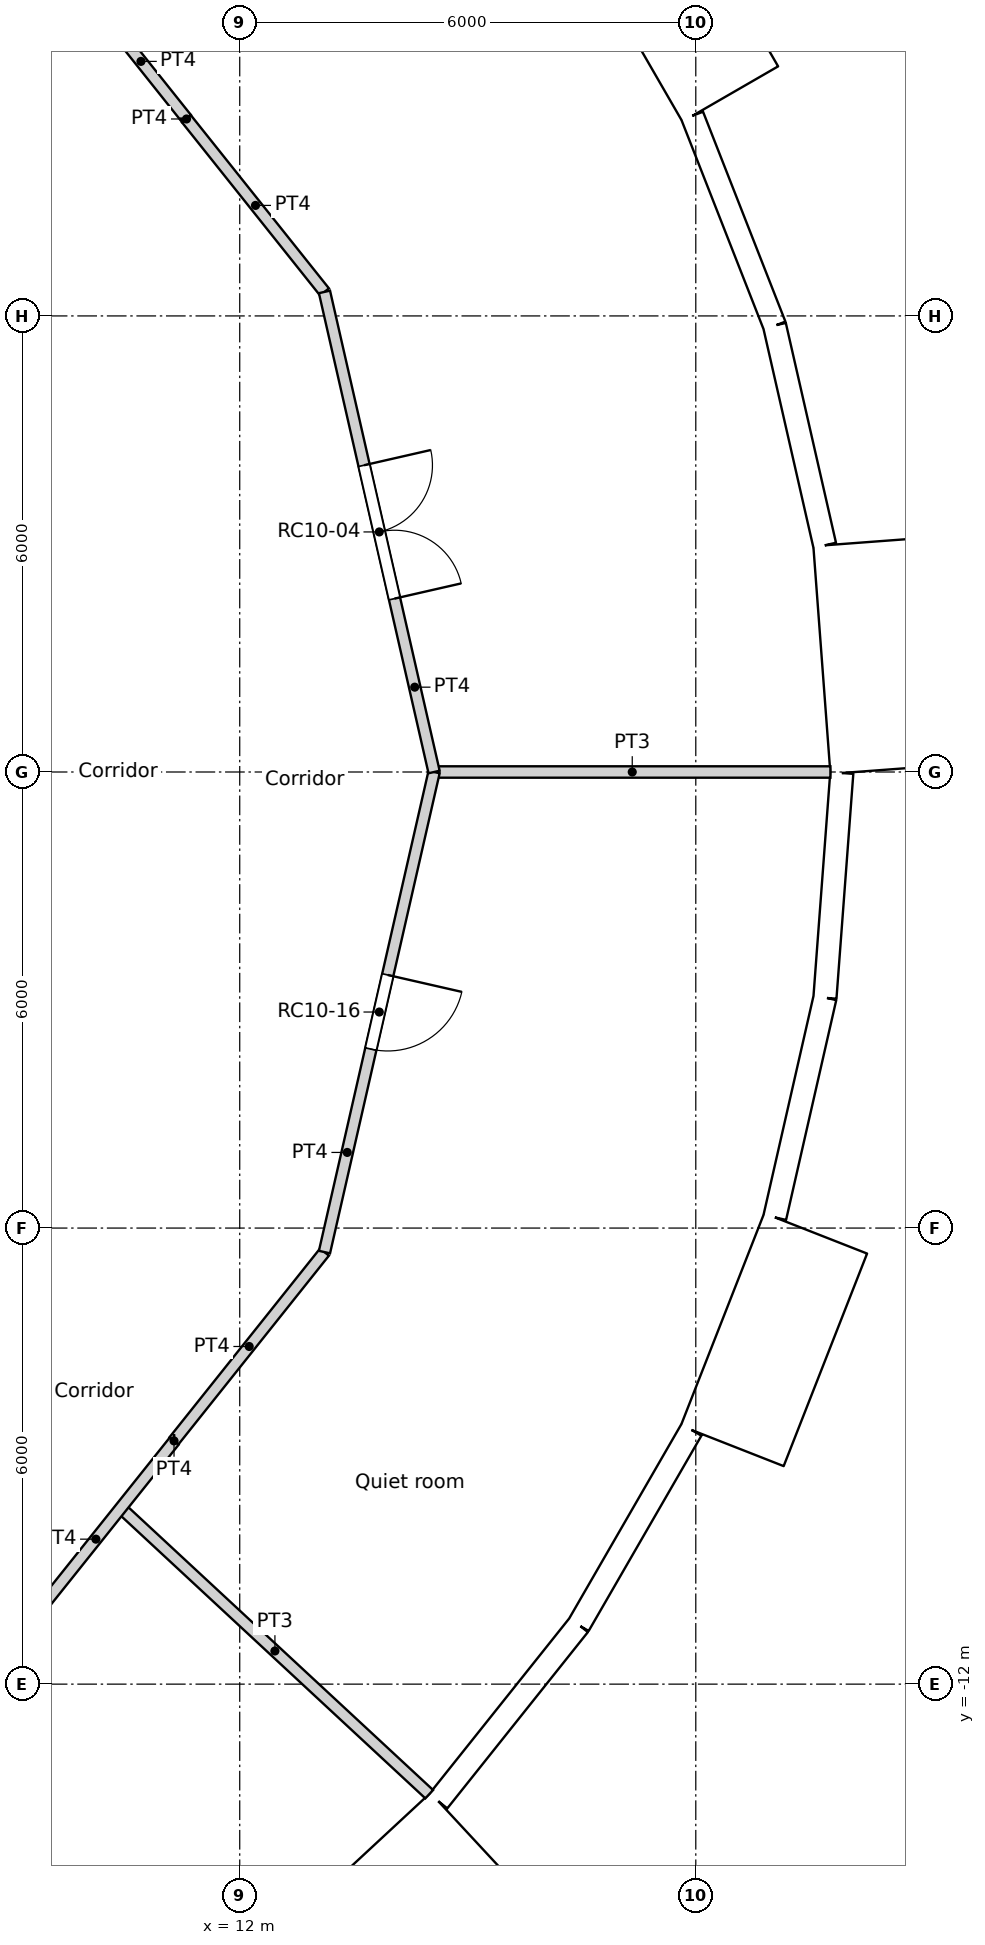
"""IFC4 building model, lengths in metres.
Left out: names, types, materials, properties, quantities, classifications, styles, units other than length and angle.
Written with IfcOpenShell. Run it as: python <this file> out.ifc"""

import sys

from ifc_helpers import new_model, si_unit, direction, frame, frame_2d, origin, origin_2d, place, context, subcontext, project, spatial, rectangle, circle, extrude, element, fill, save


model = new_model("IFC4")
c1 = context("Model", 3, precision=1e-05, world=origin(), true_north=direction((0.0, 1.0)))
c2 = subcontext(c1, "Body", "Model", "MODEL_VIEW")
j1 = project(units=[si_unit("LENGTHUNIT", "METRE"), si_unit("PLANEANGLEUNIT", "RADIAN")], contexts=[c1])
p1 = place(None, origin())
s1 = spatial("IfcSite", under=j1, at=p1, CompositionType="ELEMENT")
p2 = place(p1, origin())
s2 = spatial("IfcBuilding", under=s1, at=p2, CompositionType="ELEMENT")
p3 = place(p2, frame((0.0, 0.0, 323.4)))
s3 = spatial("IfcBuildingStorey", under=s2, at=p3, CompositionType="ELEMENT", Elevation=323.4)
for number, where, z_axis, x_axis in (
    (1, (18.822, 0.0, 0.0), (0.0, 0.0, 1.0), (1.0, 0.0, 0.0)),
    (2, (17.986, 5.548, 0.0), (0.0, 0.0, 1.0), (1.0, 0.0, 0.0)),
    (3, (11.735, -14.716, 0.0), (0.0, 0.0, 1.0), (1.0, 0.0, 0.0)),
    (4, (15.552, -10.603, 0.0), (0.0, 0.0, 1.0), (1.0, 0.0, 0.0)),
    (5, (17.986, -5.548, 0.0), (0.0, 0.0, 1.0), (1.0, 0.0, 0.0)),
):
    element("IfcColumn", number, at=place(p3, frame(where, z_axis=z_axis, x_axis=x_axis)), inside=s3, PredefinedType="COLUMN", context=c2, shape_type="SweptSolid", body=[
        extrude(circle(Radius=0.45, at=origin_2d()), origin(), (0.0, 0.0, 1.0), 3.6),
    ])
p4 = place(p3, frame((20.496, 0.032, -0.35), z_axis=(0.0, 0.0, 1.0), x_axis=(-0.074785902127, 0.997199613339, 0.0)))
e6 = element("IfcWall", 6, at=p4, inside=s3, PredefinedType="ELEMENTEDWALL", context=c2, shape_type="SweptSolid", body=[
    extrude(rectangle(XDim=3.0, YDim=1.45, at=frame_2d((1.5, 0.0))), origin(), (0.0, 0.0, 1.0), 3.6),
])
p5 = place(p4, frame((1.5, 0.0, 1.9)))
e7 = element("IfcOpeningElement", 7, at=p5, cuts=e6, PredefinedType="OPENING", context=c2, shape_type="SweptSolid", body=[
    extrude(circle(Radius=0.9, at=origin_2d()), frame((0.0, 0.735, 0.0), z_axis=(0.0, -1.0, 0.0), x_axis=(1.0, 0.0, 0.0)), (0.0, 0.0, 1.0), 1.47),
])
p6 = place(p3, frame((19.696, 2.984, 0.0), z_axis=(0.0, 0.0, 1.0), x_axis=(-0.222529389789, 0.974925982155, 0.0)))
e8 = element("IfcWall", 8, at=p6, inside=s3, PredefinedType="SOLIDWALL", context=c2, shape_type="SweptSolid", body=[
    extrude(rectangle(XDim=2.962, YDim=0.3, at=frame_2d((1.481, 0.0))), origin(), (0.0, 0.0, 1.0), 3.25),
])
p7 = place(p6, frame((1.481, 0.0, 1.55)))
e9 = element("IfcOpeningElement", 9, at=p7, cuts=e8, PredefinedType="OPENING", context=c2, shape_type="SweptSolid", body=[
    extrude(circle(Radius=0.9, at=origin_2d()), frame((0.0, 0.16, 0.0), z_axis=(0.0, -1.0, 0.0), x_axis=(1.0, 0.0, 0.0)), (0.0, 0.0, 1.0), 0.32),
])
p8 = place(p3, frame((19.037, 5.872, 0.0), z_axis=(0.0, 0.0, 1.0), x_axis=(-0.36530043032, 0.930889679612, 0.0)))
e10 = element("IfcWall", 10, at=p8, inside=s3, PredefinedType="SOLIDWALL", context=c2, shape_type="SweptSolid", body=[
    extrude(rectangle(XDim=2.962, YDim=0.3, at=frame_2d((1.481, 0.0))), origin(), (0.0, 0.0, 1.0), 3.25),
])
p9 = place(p8, frame((1.481, 0.0, 1.55)))
e11 = element("IfcOpeningElement", 11, at=p9, cuts=e10, PredefinedType="OPENING", context=c2, shape_type="SweptSolid", body=[
    extrude(circle(Radius=0.9, at=origin_2d()), frame((0.0, 0.16, 0.0), z_axis=(0.0, -1.0, 0.0), x_axis=(1.0, 0.0, 0.0)), (0.0, 0.0, 1.0), 0.32),
])
p10 = place(p3, frame((18.452, 8.921, -0.35), z_axis=(0.0, 0.0, 1.0), x_axis=(-0.499990139034, 0.866031096941, 0.0)))
e12 = element("IfcWall", 12, at=p10, inside=s3, PredefinedType="ELEMENTEDWALL", context=c2, shape_type="SweptSolid", body=[
    extrude(rectangle(XDim=3.0, YDim=1.45, at=frame_2d((1.5, 0.0))), origin(), (0.0, 0.0, 1.0), 3.6),
])
p11 = place(p10, frame((1.5, 0.0, 1.9)))
e13 = element("IfcOpeningElement", 13, at=p11, cuts=e12, PredefinedType="OPENING", context=c2, shape_type="SweptSolid", body=[
    extrude(circle(Radius=0.9, at=origin_2d()), frame((0.0, 0.735, 0.0), z_axis=(0.0, -1.0, 0.0), x_axis=(1.0, 0.0, 0.0)), (0.0, 0.0, 1.0), 1.47),
])
p12 = place(p3, frame((12.804, -16.005, -0.35), z_axis=(0.0, 0.0, 1.0), x_axis=(0.733022439167, 0.680204457261, 0.0)))
e14 = element("IfcWall", 14, at=p12, inside=s3, PredefinedType="ELEMENTEDWALL", context=c2, shape_type="SweptSolid", body=[
    extrude(rectangle(XDim=3.0, YDim=1.45, at=frame_2d((1.5, 0.0))), origin(), (0.0, 0.0, 1.0), 3.6),
])
p13 = place(p12, frame((1.5, 0.0, 1.9)))
e15 = element("IfcOpeningElement", 15, at=p13, cuts=e14, PredefinedType="OPENING", context=c2, shape_type="SweptSolid", body=[
    extrude(circle(Radius=0.9, at=origin_2d()), frame((0.0, 0.735, 0.0), z_axis=(0.0, -1.0, 0.0), x_axis=(1.0, 0.0, 0.0)), (0.0, 0.0, 1.0), 1.47),
])
p14 = place(p3, frame((14.613, -13.538, 0.0), z_axis=(0.0, 0.0, 1.0), x_axis=(0.623498236992, 0.781824755599, 0.0)))
e16 = element("IfcWall", 16, at=p14, inside=s3, PredefinedType="SOLIDWALL", context=c2, shape_type="SweptSolid", body=[
    extrude(rectangle(XDim=2.962, YDim=0.3, at=frame_2d((1.481, 0.0))), origin(), (0.0, 0.0, 1.0), 3.25),
])
p15 = place(p14, frame((1.481, 0.0, 1.55)))
e17 = element("IfcOpeningElement", 17, at=p15, cuts=e16, PredefinedType="OPENING", context=c2, shape_type="SweptSolid", body=[
    extrude(circle(Radius=0.9, at=origin_2d()), frame((0.0, 0.16, 0.0), z_axis=(0.0, -1.0, 0.0), x_axis=(1.0, 0.0, 0.0)), (0.0, 0.0, 1.0), 0.32),
])
p16 = place(p3, frame((16.46, -11.222, 0.0), z_axis=(0.0, 0.0, 1.0), x_axis=(0.499950756475, 0.86605383268, 0.0)))
e18 = element("IfcWall", 18, at=p16, inside=s3, PredefinedType="SOLIDWALL", context=c2, shape_type="SweptSolid", body=[
    extrude(rectangle(XDim=2.962, YDim=0.3, at=frame_2d((1.481, 0.0))), origin(), (0.0, 0.0, 1.0), 3.25),
])
p17 = place(p16, frame((1.481, 0.0, 1.55)))
e19 = element("IfcOpeningElement", 19, at=p17, cuts=e18, PredefinedType="OPENING", context=c2, shape_type="SweptSolid", body=[
    extrude(circle(Radius=0.9, at=origin_2d()), frame((0.0, 0.16, 0.0), z_axis=(0.0, -1.0, 0.0), x_axis=(1.0, 0.0, 0.0)), (0.0, 0.0, 1.0), 0.32),
])
p18 = place(p3, frame((18.48, -8.864, -0.35), z_axis=(0.0, 0.0, 1.0), x_axis=(0.36537792632, 0.93085926485, 0.0)))
e20 = element("IfcWall", 20, at=p18, inside=s3, PredefinedType="ELEMENTEDWALL", context=c2, shape_type="SweptSolid", body=[
    extrude(rectangle(XDim=3.0, YDim=1.45, at=frame_2d((1.5, 0.0))), origin(), (0.0, 0.0, 1.0), 3.6),
])
p19 = place(p18, frame((1.5, 0.0, 1.9)))
e21 = element("IfcOpeningElement", 21, at=p19, cuts=e20, PredefinedType="OPENING", context=c2, shape_type="SweptSolid", body=[
    extrude(circle(Radius=0.9, at=origin_2d()), frame((0.0, 0.735, 0.0), z_axis=(0.0, -1.0, 0.0), x_axis=(1.0, 0.0, 0.0)), (0.0, 0.0, 1.0), 1.47),
])
p20 = place(p3, frame((19.04, -5.857, 0.0), z_axis=(0.0, 0.0, 1.0), x_axis=(0.222529389789, 0.974925982155, 0.0)))
e22 = element("IfcWall", 22, at=p20, inside=s3, PredefinedType="SOLIDWALL", context=c2, shape_type="SweptSolid", body=[
    extrude(rectangle(XDim=2.962, YDim=0.3, at=frame_2d((1.481, 0.0))), origin(), (0.0, 0.0, 1.0), 3.25),
])
p21 = place(p20, frame((1.481, 0.0, 1.55)))
e23 = element("IfcOpeningElement", 23, at=p21, cuts=e22, PredefinedType="OPENING", context=c2, shape_type="SweptSolid", body=[
    extrude(circle(Radius=0.9, at=origin_2d()), frame((0.0, 0.16, 0.0), z_axis=(0.0, -1.0, 0.0), x_axis=(1.0, 0.0, 0.0)), (0.0, 0.0, 1.0), 0.32),
])
p22 = place(p3, frame((19.699, -2.969, 0.0), z_axis=(0.0, 0.0, 1.0), x_axis=(0.07474897196, 0.997202382263, 0.0)))
e24 = element("IfcWall", 24, at=p22, inside=s3, PredefinedType="SOLIDWALL", context=c2, shape_type="SweptSolid", body=[
    extrude(rectangle(XDim=2.962, YDim=0.3, at=frame_2d((1.481, 0.0))), origin(), (0.0, 0.0, 1.0), 3.25),
])
p23 = place(p22, frame((1.481, 0.0, 1.55)))
e25 = element("IfcOpeningElement", 25, at=p23, cuts=e24, PredefinedType="OPENING", context=c2, shape_type="SweptSolid", body=[
    extrude(circle(Radius=0.9, at=origin_2d()), frame((0.0, 0.16, 0.0), z_axis=(0.0, -1.0, 0.0), x_axis=(1.0, 0.0, 0.0)), (0.0, 0.0, 1.0), 0.32),
])
p24 = place(p3, frame((10.101, 10.101, 0.0), z_axis=(0.0, 0.0, 1.0), x_axis=(0.623130947784, -0.782117524362, 0.0)))
e26 = element("IfcWall", 26, at=p24, inside=s3, PredefinedType="PARTITIONING", context=c2, shape_type="SweptSolid", body=[
    extrude(rectangle(XDim=1.924, YDim=0.15, at=frame_2d((0.962, 0.0))), origin(), (0.0, 0.0, 1.0), 3.25),
])
p25 = place(p3, frame((11.3, 8.586, 0.0), z_axis=(0.0, 0.0, 1.0), x_axis=(0.0, 1.0, 0.0)))
e27 = element("IfcWall", 27, at=p25, inside=s3, PredefinedType="PARTITIONING", context=c2, shape_type="SweptSolid", body=[
    extrude(rectangle(XDim=0.01, YDim=0.15, at=frame_2d((0.005, 0.0))), origin(), (0.0, 0.0, 1.0), 3.25),
])
p26 = place(p3, frame((9.078, -11.382, 0.0), z_axis=(0.0, 0.0, 1.0), x_axis=(0.624018330412, 0.781409702595, 0.0)))
e28 = element("IfcWall", 28, at=p26, inside=s3, PredefinedType="PARTITIONING", context=c2, shape_type="SweptSolid", body=[
    extrude(rectangle(XDim=3.301, YDim=0.15, at=frame_2d((1.65, 0.0))), origin(), (0.0, 0.0, 1.0), 3.25),
])
p27 = place(p3, frame((11.137, -8.8, 0.0), z_axis=(0.0, 0.0, 1.0), x_axis=(-1.0, 0.0, 0.0)))
e29 = element("IfcWall", 29, at=p27, inside=s3, PredefinedType="PARTITIONING", context=c2, shape_type="SweptSolid", body=[
    extrude(rectangle(XDim=0.003, YDim=0.15, at=frame_2d((0.001, 0.0))), origin(), (0.0, 0.0, 1.0), 3.25),
])
p28 = place(p3, frame((11.3, 8.592, 0.0), z_axis=(0.0, 0.0, 1.0), x_axis=(0.623446514299, -0.781866001185, 0.0)))
e30 = element("IfcWall", 30, at=p28, inside=s3, PredefinedType="PARTITIONING", context=c2, shape_type="SweptSolid", body=[
    extrude(rectangle(XDim=2.911, YDim=0.15, at=frame_2d((1.456, 0.0))), origin(), (0.0, 0.0, 1.0), 3.25),
])
p29 = place(p3, frame((13.115, 6.316, 0.0), z_axis=(0.0, 0.0, 1.0), x_axis=(0.222568978642, -0.97491694505, 0.0)))
e31 = element("IfcWall", 31, at=p29, inside=s3, PredefinedType="PARTITIONING", context=c2, shape_type="SweptSolid", body=[
    extrude(rectangle(XDim=6.479, YDim=0.15, at=frame_2d((3.239, 0.0))), origin(), (0.0, 0.0, 1.0), 3.25),
])
p30 = place(p29, frame((2.339, 0.0, 0.0)))
e32 = element("IfcOpeningElement", 32, at=p30, cuts=e31, PredefinedType="OPENING", context=c2, shape_type="SweptSolid", body=[
    extrude(rectangle(XDim=1.8, YDim=2.1, at=frame_2d((0.9, 1.05))), frame((0.0, 0.075, 0.0), z_axis=(0.0, -1.0, 0.0), x_axis=(1.0, 0.0, 0.0)), (0.0, 0.0, 1.0), 0.15),
])
p31 = place(p3, frame((13.115, -6.316, 0.0), z_axis=(0.0, 0.0, 1.0), x_axis=(0.222568978642, 0.97491694505, 0.0)))
e33 = element("IfcWall", 33, at=p31, inside=s3, PredefinedType="PARTITIONING", context=c2, shape_type="SweptSolid", body=[
    extrude(rectangle(XDim=6.479, YDim=0.15, at=frame_2d((3.239, 0.0))), origin(), (0.0, 0.0, 1.0), 3.25),
])
p32 = place(p31, frame((2.74, 0.0, 0.0)))
e34 = element("IfcOpeningElement", 34, at=p32, cuts=e33, PredefinedType="OPENING", context=c2, shape_type="SweptSolid", body=[
    extrude(rectangle(XDim=1.0, YDim=2.04, at=frame_2d((0.5, 1.02))), frame((0.0, 0.075, 0.0), z_axis=(0.0, -1.0, 0.0), x_axis=(1.0, 0.0, 0.0)), (0.0, 0.0, 1.0), 0.15),
])
p33 = place(p3, frame((11.134, -8.8, 0.0), z_axis=(0.0, 0.0, 1.0), x_axis=(0.623476099415, 0.781842409606, 0.0)))
e35 = element("IfcWall", 35, at=p33, inside=s3, PredefinedType="PARTITIONING", context=c2, shape_type="SweptSolid", body=[
    extrude(rectangle(XDim=3.177, YDim=0.15, at=frame_2d((1.589, 0.0))), origin(), (0.0, 0.0, 1.0), 3.25),
])
p34 = place(p3, frame((14.557, 0.0, 0.0), z_axis=(0.0, 0.0, 1.0), x_axis=(1.0, 0.0, 0.0)))
e36 = element("IfcWall", 36, at=p34, inside=s3, PredefinedType="PARTITIONING", context=c2, shape_type="SweptSolid", body=[
    extrude(rectangle(XDim=5.214, YDim=0.15, at=frame_2d((2.607, 0.0))), origin(), (0.0, 0.0, 1.0), 3.25),
])
p35 = place(p3, frame((10.433, -9.68, 0.0), z_axis=(0.0, 0.0, 1.0), x_axis=(0.73295202722, -0.68028032883, 0.0)))
e37 = element("IfcWall", 37, at=p35, inside=s3, PredefinedType="PARTITIONING", context=c2, shape_type="SweptSolid", body=[
    extrude(rectangle(XDim=5.539, YDim=0.15, at=frame_2d((2.77, 0.0))), origin(), (0.0, 0.0, 1.0), 3.25),
])
p36 = place(p5, origin())
e38 = element("IfcWindow", 38, at=p36, inside=s3, PartitioningType="SINGLE_PANEL", PredefinedType="WINDOW", context=c2, shape_type="SweptSolid", body=[
    extrude(circle(Radius=0.9, at=origin_2d()), frame((0.0, 0.695, 0.0), z_axis=(0.0, -1.0, 0.0), x_axis=(1.0, 0.0, 0.0)), (0.0, 0.0, 1.0), 0.1),
])
fill(e7, e38)
p37 = place(p7, origin())
e39 = element("IfcWindow", 39, at=p37, inside=s3, PartitioningType="SINGLE_PANEL", PredefinedType="WINDOW", context=c2, shape_type="SweptSolid", body=[
    extrude(circle(Radius=0.9, at=origin_2d()), frame((0.0, 0.12, 0.0), z_axis=(0.0, -1.0, 0.0), x_axis=(1.0, 0.0, 0.0)), (0.0, 0.0, 1.0), 0.1),
])
fill(e9, e39)
p38 = place(p9, origin())
e40 = element("IfcWindow", 40, at=p38, inside=s3, PartitioningType="SINGLE_PANEL", PredefinedType="WINDOW", context=c2, shape_type="SweptSolid", body=[
    extrude(circle(Radius=0.9, at=origin_2d()), frame((0.0, 0.12, 0.0), z_axis=(0.0, -1.0, 0.0), x_axis=(1.0, 0.0, 0.0)), (0.0, 0.0, 1.0), 0.1),
])
fill(e11, e40)
p39 = place(p11, origin())
e41 = element("IfcWindow", 41, at=p39, inside=s3, PartitioningType="SINGLE_PANEL", PredefinedType="WINDOW", context=c2, shape_type="SweptSolid", body=[
    extrude(circle(Radius=0.9, at=origin_2d()), frame((0.0, 0.695, 0.0), z_axis=(0.0, -1.0, 0.0), x_axis=(1.0, 0.0, 0.0)), (0.0, 0.0, 1.0), 0.1),
])
fill(e13, e41)
p40 = place(p13, origin())
e42 = element("IfcWindow", 42, at=p40, inside=s3, PartitioningType="SINGLE_PANEL", PredefinedType="WINDOW", context=c2, shape_type="SweptSolid", body=[
    extrude(circle(Radius=0.9, at=origin_2d()), frame((0.0, 0.695, 0.0), z_axis=(0.0, -1.0, 0.0), x_axis=(1.0, 0.0, 0.0)), (0.0, 0.0, 1.0), 0.1),
])
fill(e15, e42)
p41 = place(p15, origin())
e43 = element("IfcWindow", 43, at=p41, inside=s3, PartitioningType="SINGLE_PANEL", PredefinedType="WINDOW", context=c2, shape_type="SweptSolid", body=[
    extrude(circle(Radius=0.9, at=origin_2d()), frame((0.0, 0.12, 0.0), z_axis=(0.0, -1.0, 0.0), x_axis=(1.0, 0.0, 0.0)), (0.0, 0.0, 1.0), 0.1),
])
fill(e17, e43)
p42 = place(p17, origin())
e44 = element("IfcWindow", 44, at=p42, inside=s3, PartitioningType="SINGLE_PANEL", PredefinedType="WINDOW", context=c2, shape_type="SweptSolid", body=[
    extrude(circle(Radius=0.9, at=origin_2d()), frame((0.0, 0.12, 0.0), z_axis=(0.0, -1.0, 0.0), x_axis=(1.0, 0.0, 0.0)), (0.0, 0.0, 1.0), 0.1),
])
fill(e19, e44)
p43 = place(p19, origin())
e45 = element("IfcWindow", 45, at=p43, inside=s3, PartitioningType="SINGLE_PANEL", PredefinedType="WINDOW", context=c2, shape_type="SweptSolid", body=[
    extrude(circle(Radius=0.9, at=origin_2d()), frame((0.0, 0.695, 0.0), z_axis=(0.0, -1.0, 0.0), x_axis=(1.0, 0.0, 0.0)), (0.0, 0.0, 1.0), 0.1),
])
fill(e21, e45)
p44 = place(p21, origin())
e46 = element("IfcWindow", 46, at=p44, inside=s3, PartitioningType="SINGLE_PANEL", PredefinedType="WINDOW", context=c2, shape_type="SweptSolid", body=[
    extrude(circle(Radius=0.9, at=origin_2d()), frame((0.0, 0.12, 0.0), z_axis=(0.0, -1.0, 0.0), x_axis=(1.0, 0.0, 0.0)), (0.0, 0.0, 1.0), 0.1),
])
fill(e23, e46)
p45 = place(p23, origin())
e47 = element("IfcWindow", 47, at=p45, inside=s3, PartitioningType="SINGLE_PANEL", PredefinedType="WINDOW", context=c2, shape_type="SweptSolid", body=[
    extrude(circle(Radius=0.9, at=origin_2d()), frame((0.0, 0.12, 0.0), z_axis=(0.0, -1.0, 0.0), x_axis=(1.0, 0.0, 0.0)), (0.0, 0.0, 1.0), 0.1),
])
fill(e25, e47)
p46 = place(p30, origin())
e48 = element("IfcDoor", 48, at=p46, inside=s3, OperationType="DOUBLE_DOOR_SINGLE_SWING", PredefinedType="DOOR", context=c2, shape_type="SweptSolid", body=[
    extrude(rectangle(XDim=1.8, YDim=2.1, at=frame_2d((0.9, 1.05))), frame((0.0, 0.025, 0.0), z_axis=(0.0, -1.0, 0.0), x_axis=(1.0, 0.0, 0.0)), (0.0, 0.0, 1.0), 0.05),
])
fill(e32, e48)
p47 = place(p32, origin())
e49 = element("IfcDoor", 49, at=p47, inside=s3, OperationType="SINGLE_SWING_LEFT", PredefinedType="DOOR", context=c2, shape_type="SweptSolid", body=[
    extrude(rectangle(XDim=1.0, YDim=2.04, at=frame_2d((0.5, 1.02))), frame((0.0, 0.025, 0.0), z_axis=(0.0, -1.0, 0.0), x_axis=(1.0, 0.0, 0.0)), (0.0, 0.0, 1.0), 0.05),
])
fill(e34, e49)
save(model, sys.argv[1])
